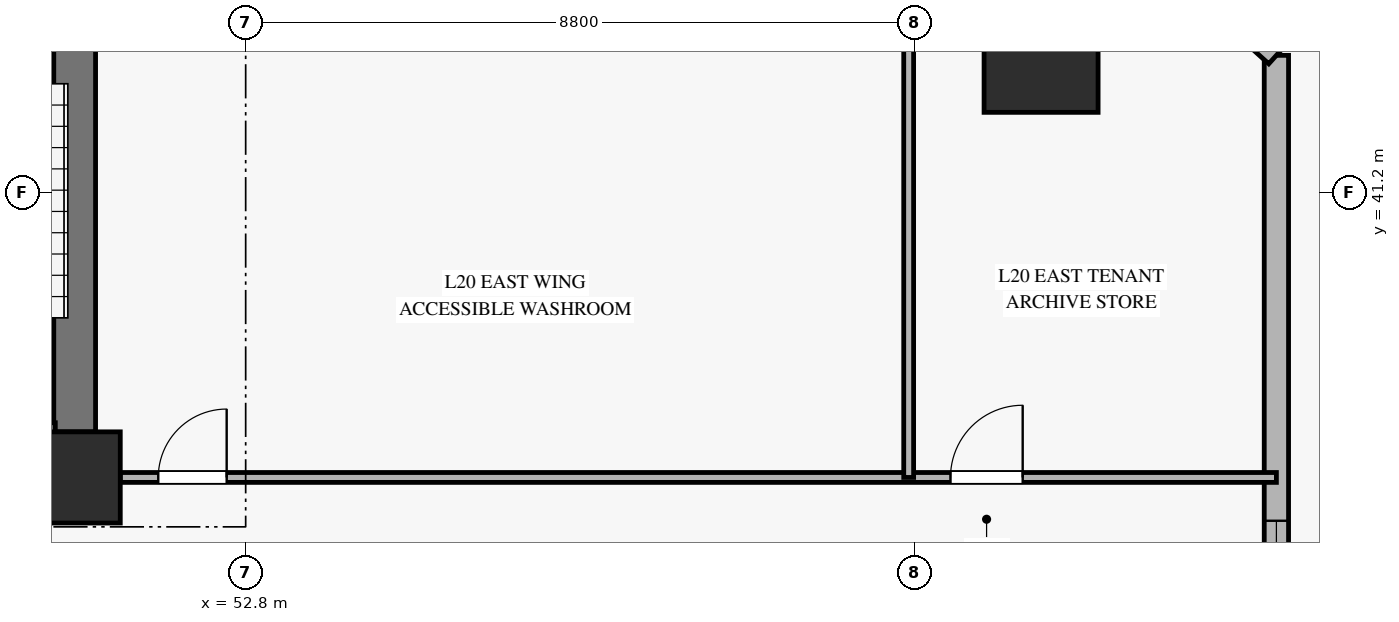
"""IFC4 building model, lengths in metres.
Left out: names, types, materials, properties, quantities, classifications, styles, units other than length and angle.
Written with IfcOpenShell. Run it as: python <this file> out.ifc"""

import sys

from ifc_helpers import new_model, si_unit, direction, frame, frame_2d, origin, origin_2d, place, context, subcontext, project, spatial, rectangle, hollow_rectangle, extrude, source, transform, mapped, element, fill, save


model = new_model("IFC4")
c1 = context("Model", 3, precision=1e-05, world=origin(), true_north=direction((0.0, 1.0)))
c2 = subcontext(c1, "Body", "Model", "MODEL_VIEW")
j1 = project(units=[si_unit("LENGTHUNIT", "METRE"), si_unit("PLANEANGLEUNIT", "RADIAN")], contexts=[c1])
p1 = place(None, origin())
s1 = spatial("IfcSite", under=j1, at=p1, CompositionType="ELEMENT")
p2 = place(p1, origin())
s2 = spatial("IfcBuilding", under=s1, at=p2, CompositionType="ELEMENT")
p3 = place(p2, frame((0.0, 0.0, 83.5)))
s3 = spatial("IfcBuildingStorey", under=s2, at=p3, CompositionType="ELEMENT", Elevation=83.5)
m1 = source(origin(), c2, "Body", "SweptSolid", [
    extrude(rectangle(XDim=1.2, YDim=1.2, at=origin_2d()), origin(), (0.0, 0.0, 1.0), 3.68),
])
p4 = place(p3, frame((50.55, 37.45, 0.0), z_axis=(0.0, 0.0, 1.0), x_axis=(1.0, 0.0, 0.0)))
e1 = element("IfcColumn", 1, at=p4, inside=s3, PredefinedType="PILASTER", context=c2, shape_type="MappedRepresentation", body=[
    mapped(m1, transform((0.0, 0.0, 0.0), x_axis=(1.0, 0.0, 0.0), y_axis=(0.0, 1.0, 0.0), z_axis=(0.0, 0.0, 1.0), scale=1.0)),
])
p5 = place(p3, frame((50.55, 38.05, 0.0), z_axis=(0.0, 0.0, 1.0), x_axis=(0.0, 1.0, 0.0)))
e2 = element("IfcWall", 2, at=p5, inside=s3, PredefinedType="SHEAR", context=c2, shape_type="SweptSolid", body=[
    extrude(rectangle(XDim=7.9, YDim=0.55, at=frame_2d((3.95, 0.0))), origin(), (0.0, 0.0, 1.0), 3.68),
])
m2 = source(origin(), c2, "Body", "SweptSolid", [
    extrude(hollow_rectangle(XDim=1.5, YDim=1.5, WallThickness=0.07, at=origin_2d()), origin(), (0.0, 0.0, 1.0), 3.686),
])
p6 = place(p3, frame((63.265, 43.004, 0.0), z_axis=(-0.056697506007, 0.007087188251, 0.998366247714), x_axis=(-0.124034734589, -0.992277876714, 0.0)))
e3 = element("IfcColumn", 3, at=p6, inside=s3, PredefinedType="COLUMN", context=c2, shape_type="MappedRepresentation", body=[
    mapped(m2, transform((0.0, 0.0, 0.0), x_axis=(1.0, 0.0, 0.0), y_axis=(0.0, 1.0, 0.0), z_axis=(0.0, 0.0, 1.0), scale=1.0)),
])
p7 = place(p3, frame((66.361, 26.255, 0.0), z_axis=(0.0, 0.0, 1.0), x_axis=(0.0, 1.0, 0.0)))
e4 = element("IfcWall", 4, at=p7, inside=s3, PredefinedType="SOLIDWALL", context=c2, shape_type="SweptSolid", body=[
    extrude(rectangle(XDim=16.749, YDim=0.32, at=frame_2d((8.375, 0.0))), origin(), (0.0, 0.0, 1.0), 3.16),
])
p8 = place(p7, frame((9.425, 0.0, 0.45)))
e5 = element("IfcOpeningElement", 5, at=p8, cuts=e4, PredefinedType="OPENING", context=c2, shape_type="SweptSolid", body=[
    extrude(rectangle(XDim=1.2, YDim=2.0, at=frame_2d((0.6, 1.0))), frame((0.0, 0.17, 0.0), z_axis=(0.0, -1.0, 0.0), x_axis=(1.0, 0.0, 0.0)), (0.0, 0.0, 1.0), 0.34),
])
p9 = place(p3, frame((66.361, 43.004, 0.0), z_axis=(0.0, 0.0, 1.0), x_axis=(-0.74231608288, 0.67004987359, 0.0)))
e6 = element("IfcWall", 6, at=p9, inside=s3, PredefinedType="SOLIDWALL", context=c2, shape_type="SweptSolid", body=[
    extrude(rectangle(XDim=4.844, YDim=0.3, at=frame_2d((2.422, 0.0))), origin(), (0.0, 0.0, 1.0), 3.16),
])
p10 = place(p9, frame((1.622, 0.0, 0.45)))
e7 = element("IfcOpeningElement", 7, at=p10, cuts=e6, PredefinedType="OPENING", context=c2, shape_type="SweptSolid", body=[
    extrude(rectangle(XDim=1.6, YDim=2.0, at=frame_2d((0.8, 1.0))), frame((0.0, 0.16, 0.0), z_axis=(0.0, -1.0, 0.0), x_axis=(1.0, 0.0, 0.0)), (0.0, 0.0, 1.0), 0.32),
])
p11 = place(p3, frame((47.44, 38.07, 0.0), z_axis=(0.0, 0.0, 1.0), x_axis=(1.0, 0.0, 0.0)))
e8 = element("IfcWall", 8, at=p11, inside=s3, PredefinedType="SOLIDWALL", context=c2, shape_type="SweptSolid", body=[
    extrude(rectangle(XDim=2.855, YDim=0.2, at=frame_2d((1.427, 0.0))), origin(), (0.0, 0.0, 1.0), 3.9),
])
p12 = place(p3, frame((51.15, 37.45, 0.0), z_axis=(0.0, 0.0, 1.0), x_axis=(1.0, 0.0, 0.0)))
e9 = element("IfcWall", 9, at=p12, inside=s3, PredefinedType="PARTITIONING", context=c2, shape_type="SweptSolid", body=[
    extrude(rectangle(XDim=15.211, YDim=0.13, at=frame_2d((7.605, 0.0))), origin(), (0.0, 0.0, 1.0), 3.165),
])
p13 = place(p12, frame((0.5, 0.0, 0.0)))
e10 = element("IfcOpeningElement", 10, at=p13, cuts=e9, PredefinedType="OPENING", context=c2, shape_type="SweptSolid", body=[
    extrude(rectangle(XDim=0.9, YDim=2.1, at=frame_2d((0.45, 1.05))), frame((0.0, 0.075, 0.0), z_axis=(0.0, -1.0, 0.0), x_axis=(1.0, 0.0, 0.0)), (0.0, 0.0, 1.0), 0.15),
])
p14 = place(p12, frame((10.923, 0.0, 0.0)))
e11 = element("IfcOpeningElement", 11, at=p14, cuts=e9, PredefinedType="OPENING", context=c2, shape_type="SweptSolid", body=[
    extrude(rectangle(XDim=0.95, YDim=2.1, at=frame_2d((0.475, 1.05))), frame((0.0, 0.075, 0.0), z_axis=(0.0, -1.0, 0.0), x_axis=(1.0, 0.0, 0.0)), (0.0, 0.0, 1.0), 0.15),
])
p15 = place(p3, frame((61.523, 37.45, 0.0), z_axis=(0.0, 0.0, 1.0), x_axis=(0.0, 1.0, 0.0)))
e12 = element("IfcWall", 12, at=p15, inside=s3, PredefinedType="PARTITIONING", context=c2, shape_type="SweptSolid", body=[
    extrude(rectangle(XDim=8.8, YDim=0.13, at=frame_2d((4.4, 0.0))), origin(), (0.0, 0.0, 1.0), 3.68),
])
m3 = source(origin(), c2, "Body", "SweptSolid", [
    extrude(rectangle(XDim=1.2, YDim=2.0, at=frame_2d((0.6, 1.0))), frame((0.0, 0.03, 0.0), z_axis=(0.0, -1.0, 0.0), x_axis=(1.0, 0.0, 0.0)), (0.0, 0.0, 1.0), 0.06),
])
p16 = place(p8, origin())
e13 = element("IfcWindow", 13, at=p16, inside=s3, PartitioningType="SINGLE_PANEL", PredefinedType="WINDOW", context=c2, shape_type="MappedRepresentation", body=[
    mapped(m3, transform((0.0, 0.0, 0.0), x_axis=(1.0, 0.0, 0.0), y_axis=(0.0, 1.0, 0.0), z_axis=(0.0, 0.0, 1.0), scale=1.0)),
])
fill(e5, e13)
m4 = source(origin(), c2, "Body", "SweptSolid", [
    extrude(rectangle(XDim=0.9, YDim=2.1, at=frame_2d((0.45, 1.05))), frame((0.0, 0.025, 0.0), z_axis=(0.0, -1.0, 0.0), x_axis=(1.0, 0.0, 0.0)), (0.0, 0.0, 1.0), 0.05),
])
p17 = place(p13, origin())
e14 = element("IfcDoor", 14, at=p17, inside=s3, OperationType="SINGLE_SWING_RIGHT", PredefinedType="DOOR", context=c2, shape_type="MappedRepresentation", body=[
    mapped(m4, transform((0.0, 0.0, 0.0), x_axis=(1.0, 0.0, 0.0), y_axis=(0.0, 1.0, 0.0), z_axis=(0.0, 0.0, 1.0), scale=1.0)),
])
fill(e10, e14)
m5 = source(origin(), c2, "Body", "SweptSolid", [
    extrude(rectangle(XDim=0.95, YDim=2.1, at=frame_2d((0.475, 1.05))), frame((0.0, 0.025, 0.0), z_axis=(0.0, -1.0, 0.0), x_axis=(1.0, 0.0, 0.0)), (0.0, 0.0, 1.0), 0.05),
])
p18 = place(p14, origin())
e15 = element("IfcDoor", 15, at=p18, inside=s3, OperationType="SINGLE_SWING_RIGHT", PredefinedType="DOOR", context=c2, shape_type="MappedRepresentation", body=[
    mapped(m5, transform((0.0, 0.0, 0.0), x_axis=(1.0, 0.0, 0.0), y_axis=(0.0, 1.0, 0.0), z_axis=(0.0, 0.0, 1.0), scale=1.0)),
])
fill(e11, e15)
save(model, sys.argv[1])
